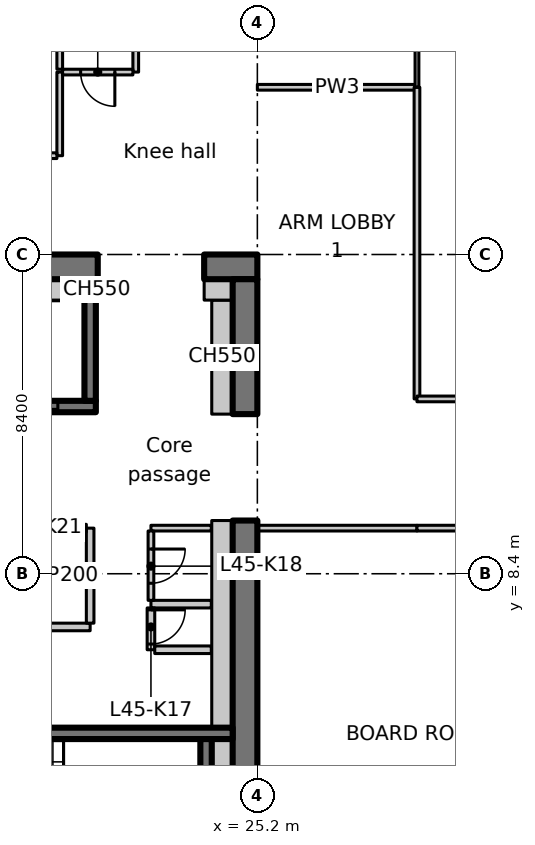
"""IFC4 building model, lengths in metres.
Left out: names, types, materials, properties, quantities, classifications, styles, units other than length and angle.
Written with IfcOpenShell. Run it as: python <this file> out.ifc"""

import sys

from ifc_helpers import new_model, si_unit, direction, frame, frame_2d, origin, place, context, subcontext, project, spatial, polyline, rectangle, outline, extrude, element, fill, save


model = new_model("IFC4")
c1 = context("Model", 3, precision=1e-05, world=origin(), true_north=direction((0.0, 1.0)))
c2 = subcontext(c1, "Body", "Model", "MODEL_VIEW")
j1 = project(units=[si_unit("LENGTHUNIT", "METRE"), si_unit("PLANEANGLEUNIT", "RADIAN")], contexts=[c1])
p1 = place(None, origin())
s1 = spatial("IfcSite", under=j1, at=p1, CompositionType="ELEMENT")
p2 = place(p1, origin())
s2 = spatial("IfcBuilding", under=s1, at=p2, CompositionType="ELEMENT")
p3 = place(p2, frame((0.0, 0.0, 181.2)))
s3 = spatial("IfcBuildingStorey", under=s2, at=p3, CompositionType="ELEMENT", Elevation=181.2)
p4 = place(p3, frame((-1.1, 16.475, 0.0), z_axis=(0.0, 0.0, 1.0), x_axis=(1.0, 0.0, 0.0)))
e1 = element("IfcWall", 1, at=p4, inside=s3, PredefinedType="SHEAR", context=c2, shape_type="SweptSolid", body=[
    extrude(rectangle(XDim=22.1, YDim=0.65, at=frame_2d((11.05, 0.0))), origin(), (0.0, 0.0, 1.0), 3.35),
])
p5 = place(p4, frame((3.15, 0.0, 0.0)))
e2 = element("IfcOpeningElement", 2, at=p5, cuts=e1, PredefinedType="OPENING", context=c2, shape_type="SweptSolid", body=[
    extrude(rectangle(XDim=1.1, YDim=2.3, at=frame_2d((0.55, 1.15))), frame((0.0, 0.335, 0.0), z_axis=(0.0, -1.0, 0.0), x_axis=(1.0, 0.0, 0.0)), (0.0, 0.0, 1.0), 0.67),
])
p6 = place(p3, frame((23.8, 16.475, 0.0), z_axis=(0.0, 0.0, 1.0), x_axis=(1.0, 0.0, 0.0)))
e3 = element("IfcWall", 3, at=p6, inside=s3, PredefinedType="SHEAR", context=c2, shape_type="SweptSolid", body=[
    extrude(rectangle(XDim=1.4, YDim=0.65, at=frame_2d((0.7, 0.0))), origin(), (0.0, 0.0, 1.0), 3.35),
])
p7 = place(p3, frame((24.875, 0.65, 0.0), z_axis=(0.0, 0.0, 1.0), x_axis=(0.0, 1.0, 0.0)))
e4 = element("IfcWall", 4, at=p7, inside=s3, PredefinedType="SHEAR", context=c2, shape_type="SweptSolid", body=[
    extrude(rectangle(XDim=9.15, YDim=0.65, at=frame_2d((4.575, 0.0))), origin(), (0.0, 0.0, 1.0), 3.35),
])
p8 = place(p3, frame((24.875, 12.6, 0.0), z_axis=(0.0, 0.0, 1.0), x_axis=(0.0, 1.0, 0.0)))
e5 = element("IfcWall", 5, at=p8, inside=s3, PredefinedType="SHEAR", context=c2, shape_type="SweptSolid", body=[
    extrude(rectangle(XDim=3.55, YDim=0.65, at=frame_2d((1.775, 0.0))), origin(), (0.0, 0.0, 1.0), 3.35),
])
p9 = place(p3, frame((24.275, 12.6, 0.0), z_axis=(0.0, 0.0, 1.0), x_axis=(0.0, 1.0, 0.0)))
e6 = element("IfcWall", 6, at=p9, inside=s3, PredefinedType="PARTITIONING", context=c2, shape_type="SweptSolid", body=[
    extrude(rectangle(XDim=3.0, YDim=0.55, at=frame_2d((1.5, 0.0))), origin(), (0.0, 0.0, 1.0), 3.35),
])
p10 = place(p3, frame((23.8, 15.875, 0.0), z_axis=(0.0, 0.0, 1.0), x_axis=(1.0, 0.0, 0.0)))
e7 = element("IfcWall", 7, at=p10, inside=s3, PredefinedType="PARTITIONING", context=c2, shape_type="SweptSolid", body=[
    extrude(rectangle(XDim=0.75, YDim=0.55, at=frame_2d((0.375, 0.0))), origin(), (0.0, 0.0, 1.0), 3.35),
])
p11 = place(p3, frame((17.85, 12.8, 0.0), z_axis=(0.0, 0.0, 1.0), x_axis=(1.0, 0.0, 0.0)))
e8 = element("IfcWall", 8, at=p11, inside=s3, PredefinedType="SHEAR", context=c2, shape_type="SweptSolid", body=[
    extrude(rectangle(XDim=3.1, YDim=0.3, at=frame_2d((1.55, 0.0))), origin(), (0.0, 0.0, 1.0), 3.35),
])
p12 = place(p11, frame((1.0, 0.0, 0.0)))
e9 = element("IfcOpeningElement", 9, at=p12, cuts=e8, PredefinedType="OPENING", context=c2, shape_type="SweptSolid", body=[
    extrude(rectangle(XDim=1.1, YDim=2.3, at=frame_2d((0.55, 1.15))), frame((0.0, 0.16, 0.0), z_axis=(0.0, -1.0, 0.0), x_axis=(1.0, 0.0, 0.0)), (0.0, 0.0, 1.0), 0.32),
])
p13 = place(p3, frame((20.8, 12.95, 0.0), z_axis=(0.0, 0.0, 1.0), x_axis=(0.0, 1.0, 0.0)))
e10 = element("IfcWall", 10, at=p13, inside=s3, PredefinedType="SHEAR", context=c2, shape_type="SweptSolid", body=[
    extrude(rectangle(XDim=3.2, YDim=0.3, at=frame_2d((1.6, 0.0))), origin(), (0.0, 0.0, 1.0), 3.35),
])
p14 = place(p3, frame((15.8, 4.2, 0.0), z_axis=(0.0, 0.0, 1.0), x_axis=(1.0, 0.0, 0.0)))
e11 = element("IfcWall", 11, at=p14, inside=s3, PredefinedType="SHEAR", context=c2, shape_type="SweptSolid", body=[
    extrude(rectangle(XDim=8.75, YDim=0.3, at=frame_2d((4.375, 0.0))), origin(), (0.0, 0.0, 1.0), 3.35),
])
p15 = place(p14, frame((0.4, 0.0, 0.0)))
e12 = element("IfcOpeningElement", 12, at=p15, cuts=e11, PredefinedType="OPENING", context=c2, shape_type="SweptSolid", body=[
    extrude(rectangle(XDim=1.0, YDim=2.1, at=frame_2d((0.5, 1.05))), frame((0.0, 0.16, 0.0), z_axis=(0.0, -1.0, 0.0), x_axis=(1.0, 0.0, 0.0)), (0.0, 0.0, 1.0), 0.32),
])
p16 = place(p3, frame((23.85, 1.5, 0.0), z_axis=(0.0, 0.0, 1.0), x_axis=(0.0, 1.0, 0.0)))
e13 = element("IfcWall", 13, at=p16, inside=s3, PredefinedType="SHEAR", context=c2, shape_type="SweptSolid", body=[
    extrude(rectangle(XDim=2.55, YDim=0.3, at=frame_2d((1.275, 0.0))), origin(), (0.0, 0.0, 1.0), 3.35),
])
p17 = place(p3, frame((12.4, 7.0, 0.0), z_axis=(0.0, 0.0, 1.0), x_axis=(1.0, 0.0, 0.0)))
e14 = element("IfcWall", 14, at=p17, inside=s3, PredefinedType="PARTITIONING", context=c2, shape_type="SweptSolid", body=[
    extrude(rectangle(XDim=8.4, YDim=0.2, at=frame_2d((4.2, 0.0))), origin(), (0.0, 0.0, 1.0), 3.35),
])
p18 = place(p3, frame((20.8, 7.1, 0.0), z_axis=(0.0, 0.0, 1.0), x_axis=(0.0, 1.0, 0.0)))
e15 = element("IfcWall", 15, at=p18, inside=s3, PredefinedType="PARTITIONING", context=c2, shape_type="SweptSolid", body=[
    extrude(rectangle(XDim=2.5, YDim=0.2, at=frame_2d((1.25, 0.0))), origin(), (0.0, 0.0, 1.0), 3.35),
])
p19 = place(p3, frame((20.7, 9.6, 0.0), z_axis=(0.0, 0.0, 1.0), x_axis=(-1.0, 0.0, 0.0)))
e16 = element("IfcWall", 16, at=p19, inside=s3, PredefinedType="PARTITIONING", context=c2, shape_type="SweptSolid", body=[
    extrude(rectangle(XDim=8.3, YDim=0.2, at=frame_2d((4.15, 0.0))), origin(), (0.0, 0.0, 1.0), 3.35),
])
p20 = place(p19, frame((3.65, 0.0, 0.0)))
e17 = element("IfcOpeningElement", 17, at=p20, cuts=e16, PredefinedType="OPENING", context=c2, shape_type="SweptSolid", body=[
    extrude(rectangle(XDim=0.9, YDim=2.1, at=frame_2d((0.45, 1.05))), frame((0.0, 0.11, 0.0), z_axis=(0.0, -1.0, 0.0), x_axis=(1.0, 0.0, 0.0)), (0.0, 0.0, 1.0), 0.22),
])
p21 = place(p3, frame((23.988, 7.6, 0.0), z_axis=(0.0, 0.0, 1.0), x_axis=(-1.0, 0.0, 0.0)))
e18 = element("IfcWall", 18, at=p21, inside=s3, PredefinedType="PARTITIONING", context=c2, shape_type="SweptSolid", body=[
    extrude(rectangle(XDim=1.588, YDim=0.2, at=frame_2d((0.794, 0.0))), origin(), (0.0, 0.0, 1.0), 3.35),
])
p22 = place(p3, frame((22.4, 7.5, 0.0), z_axis=(0.0, 0.0, 1.0), x_axis=(0.0, -1.0, 0.0)))
e19 = element("IfcWall", 19, at=p22, inside=s3, PredefinedType="PARTITIONING", context=c2, shape_type="SweptSolid", body=[
    extrude(rectangle(XDim=1.1, YDim=0.2, at=frame_2d((0.55, 0.0))), origin(), (0.0, 0.0, 1.0), 3.35),
])
p23 = place(p22, frame((0.05, 0.0, 0.0)))
e20 = element("IfcOpeningElement", 20, at=p23, cuts=e19, PredefinedType="OPENING", context=c2, shape_type="SweptSolid", body=[
    extrude(rectangle(XDim=0.9, YDim=2.1, at=frame_2d((0.45, 1.05))), frame((0.0, 0.11, 0.0), z_axis=(0.0, -1.0, 0.0), x_axis=(1.0, 0.0, 0.0)), (0.0, 0.0, 1.0), 0.22),
])
p24 = place(p3, frame((22.5, 6.4, 0.0), z_axis=(0.0, 0.0, 1.0), x_axis=(1.0, 0.0, 0.0)))
e21 = element("IfcWall", 21, at=p24, inside=s3, PredefinedType="PARTITIONING", context=c2, shape_type="SweptSolid", body=[
    extrude(rectangle(XDim=1.488, YDim=0.2, at=frame_2d((0.744, 0.0))), origin(), (0.0, 0.0, 1.0), 3.35),
])
p25 = place(p3, frame((20.0, 21.6, 0.0), z_axis=(0.0, 0.0, 1.0), x_axis=(0.0, -1.0, 0.0)))
e22 = element("IfcWall", 22, at=p25, inside=s3, PredefinedType="PARTITIONING", context=c2, shape_type="SweptSolid", body=[
    extrude(rectangle(XDim=2.2, YDim=0.15, at=frame_2d((1.1, 0.0))), origin(), (0.0, 0.0, 1.0), 3.35),
])
p26 = place(p3, frame((19.925, 19.4, 0.0), z_axis=(0.0, 0.0, 1.0), x_axis=(-1.0, 0.0, 0.0)))
e23 = element("IfcWall", 23, at=p26, inside=s3, PredefinedType="PARTITIONING", context=c2, shape_type="SweptSolid", body=[
    extrude(rectangle(XDim=5.725, YDim=0.15, at=frame_2d((2.863, 0.0))), origin(), (0.0, 0.0, 1.0), 3.35),
])
p27 = place(p26, frame((2.325, 0.0, 0.0)))
e24 = element("IfcOpeningElement", 24, at=p27, cuts=e23, PredefinedType="OPENING", context=c2, shape_type="SweptSolid", body=[
    extrude(rectangle(XDim=1.0, YDim=2.1, at=frame_2d((0.5, 1.05))), frame((0.0, 0.085, 0.0), z_axis=(0.0, -1.0, 0.0), x_axis=(1.0, 0.0, 0.0)), (0.0, 0.0, 1.0), 0.17),
])
p28 = place(p3, frame((22.0, 23.925, 0.0), z_axis=(0.0, 0.0, 1.0), x_axis=(0.0, -1.0, 0.0)))
e25 = element("IfcWall", 25, at=p28, inside=s3, PredefinedType="PARTITIONING", context=c2, shape_type="SweptSolid", body=[
    extrude(rectangle(XDim=2.325, YDim=0.15, at=frame_2d((1.163, 0.0))), origin(), (0.0, 0.0, 1.0), 3.35),
])
p29 = place(p3, frame((21.925, 21.6, 0.0), z_axis=(0.0, 0.0, 1.0), x_axis=(-1.0, 0.0, 0.0)))
e26 = element("IfcWall", 26, at=p29, inside=s3, PredefinedType="PARTITIONING", context=c2, shape_type="SweptSolid", body=[
    extrude(rectangle(XDim=1.85, YDim=0.15, at=frame_2d((0.925, 0.0))), origin(), (0.0, 0.0, 1.0), 3.35),
])
p30 = place(p29, frame((0.475, 0.0, 0.0)))
e27 = element("IfcOpeningElement", 27, at=p30, cuts=e26, PredefinedType="OPENING", context=c2, shape_type="SweptSolid", body=[
    extrude(rectangle(XDim=0.9, YDim=2.1, at=frame_2d((0.45, 1.05))), frame((0.0, 0.085, 0.0), z_axis=(0.0, -1.0, 0.0), x_axis=(1.0, 0.0, 0.0)), (0.0, 0.0, 1.0), 0.17),
])
p31 = place(p3, frame((20.0, 21.675, 0.0), z_axis=(0.0, 0.0, 1.0), x_axis=(0.0, 1.0, 0.0)))
e28 = element("IfcWall", 28, at=p31, inside=s3, PredefinedType="PARTITIONING", context=c2, shape_type="SweptSolid", body=[
    extrude(rectangle(XDim=2.15, YDim=0.15, at=frame_2d((1.075, 0.0))), origin(), (0.0, 0.0, 1.0), 3.35),
])
p32 = place(p3, frame((23.988, 9.6, 0.0), z_axis=(0.0, 0.0, 1.0), x_axis=(-1.0, 0.0, 0.0)))
e29 = element("IfcWall", 29, at=p32, inside=s3, PredefinedType="PARTITIONING", context=c2, shape_type="SweptSolid", body=[
    extrude(rectangle(XDim=1.588, YDim=0.15, at=frame_2d((0.794, 0.0))), origin(), (0.0, 0.0, 1.0), 3.35),
])
p33 = place(p3, frame((22.4, 9.525, 0.0), z_axis=(0.0, 0.0, 1.0), x_axis=(0.0, -1.0, 0.0)))
e30 = element("IfcWall", 30, at=p33, inside=s3, PredefinedType="PARTITIONING", context=c2, shape_type="SweptSolid", body=[
    extrude(rectangle(XDim=1.825, YDim=0.15, at=frame_2d((0.913, 0.0))), origin(), (0.0, 0.0, 1.0), 3.35),
])
p34 = place(p33, frame((0.475, 0.0, 0.0)))
e31 = element("IfcOpeningElement", 31, at=p34, cuts=e30, PredefinedType="OPENING", context=c2, shape_type="SweptSolid", body=[
    extrude(rectangle(XDim=0.9, YDim=2.1, at=frame_2d((0.45, 1.05))), frame((0.0, 0.085, 0.0), z_axis=(0.0, -1.0, 0.0), x_axis=(1.0, 0.0, 0.0)), (0.0, 0.0, 1.0), 0.17),
])
p35 = place(p3, frame((18.15, 15.875, 0.0), z_axis=(0.0, 0.0, 1.0), x_axis=(1.0, 0.0, 0.0)))
e32 = element("IfcWall", 32, at=p35, inside=s3, PredefinedType="PARTITIONING", context=c2, shape_type="SweptSolid", body=[
    extrude(rectangle(XDim=2.5, YDim=0.55, at=frame_2d((1.25, 0.0))), origin(), (0.0, 0.0, 1.0), 3.35),
])
p36 = place(p3, frame((20.95, 15.875, 0.0), z_axis=(0.0, 0.0, 1.0), x_axis=(1.0, 0.0, 0.0)))
e33 = element("IfcWall", 33, at=p36, inside=s3, PredefinedType="PARTITIONING", context=c2, shape_type="SweptSolid", body=[
    extrude(rectangle(XDim=0.05, YDim=0.55, at=frame_2d((0.025, 0.0))), origin(), (0.0, 0.0, 1.0), 3.35),
])
p37 = place(p3, frame((24.275, 1.5, 0.0), z_axis=(0.0, 0.0, 1.0), x_axis=(0.0, 1.0, 0.0)))
e34 = element("IfcWall", 34, at=p37, inside=s3, PredefinedType="PARTITIONING", context=c2, shape_type="SweptSolid", body=[
    extrude(rectangle(XDim=2.55, YDim=0.55, at=frame_2d((1.275, 0.0))), origin(), (0.0, 0.0, 1.0), 3.35),
])
p38 = place(p3, frame((24.275, 4.35, 0.0), z_axis=(0.0, 0.0, 1.0), x_axis=(0.0, 1.0, 0.0)))
e35 = element("IfcWall", 35, at=p38, inside=s3, PredefinedType="PARTITIONING", context=c2, shape_type="SweptSolid", body=[
    extrude(rectangle(XDim=5.45, YDim=0.55, at=frame_2d((2.725, 0.0))), origin(), (0.0, 0.0, 1.0), 3.35),
])
for number, where, z_axis, x_axis in (
    (36, (25.2, 21.2, 0.0), (0.0, 0.0, 1.0), (1.0, 0.0, 0.0)),
    (37, (29.4, 9.6, 0.0), (0.0, 0.0, 1.0), (-1.0, 0.0, 0.0)),
):
    element("IfcWall", number, at=place(p3, frame(where, z_axis=z_axis, x_axis=x_axis)), inside=s3, PredefinedType="PARTITIONING", context=c2, shape_type="SweptSolid", body=[
        extrude(rectangle(XDim=4.2, YDim=0.15, at=frame_2d((2.1, 0.0))), origin(), (0.0, 0.0, 1.0), 3.33),
    ])
p39 = place(p3, frame((29.4, 21.2, 0.0), z_axis=(0.0, 0.0, 1.0), x_axis=(0.0, -1.0, 0.0)))
e38 = element("IfcWall", 38, at=p39, inside=s3, PredefinedType="PARTITIONING", context=c2, shape_type="SweptSolid", body=[
    extrude(rectangle(XDim=8.2, YDim=0.15, at=frame_2d((4.1, 0.0))), origin(), (0.0, 0.0, 1.0), 3.33),
])
p40 = place(p3, frame((29.4, 27.511, 0.0), z_axis=(0.0, 0.0, 1.0), x_axis=(0.0, -1.0, 0.0)))
e39 = element("IfcWall", 39, at=p40, inside=s3, PredefinedType="PARTITIONING", context=c2, shape_type="SweptSolid", body=[
    extrude(outline(polyline([(0.0, 0.0), (6.311, 0.0), (6.311, 3.33), (2.761, 3.33), (2.759, 2.98), (1.863, 2.98), (1.861, 3.33), (0.236, 3.33), (0.0, 3.33), (0.0, 0.0)])), frame((0.0, 0.05, 0.0), z_axis=(0.0, -1.0, 0.0), x_axis=(1.0, 0.0, 0.0)), (0.0, 0.0, 1.0), 0.1),
])
for number, where, z_axis, x_axis in (
    (40, (33.6, 9.6, 0.0), (0.0, 0.0, 1.0), (-1.0, 0.0, 0.0)),
    (41, (29.4, 13.0, 0.0), (0.0, 0.0, 1.0), (1.0, 0.0, 0.0)),
):
    element("IfcWall", number, at=place(p3, frame(where, z_axis=z_axis, x_axis=x_axis)), inside=s3, PredefinedType="PARTITIONING", context=c2, shape_type="SweptSolid", body=[
        extrude(rectangle(XDim=4.2, YDim=0.15, at=frame_2d((2.1, 0.0))), origin(), (0.0, 0.0, 1.0), 3.33),
    ])
p41 = place(p12, origin())
e42 = element("IfcDoor", 42, at=p41, inside=s3, OperationType="SLIDING_TO_LEFT", PredefinedType="DOOR", context=c2, shape_type="SweptSolid", body=[
    extrude(rectangle(XDim=1.1, YDim=2.3, at=frame_2d((0.55, 1.15))), frame((0.0, 0.025, 0.0), z_axis=(0.0, -1.0, 0.0), x_axis=(1.0, 0.0, 0.0)), (0.0, 0.0, 1.0), 0.05),
])
fill(e9, e42)
p42 = place(p23, origin())
e43 = element("IfcDoor", 43, at=p42, inside=s3, OperationType="SINGLE_SWING_RIGHT", PredefinedType="DOOR", context=c2, shape_type="SweptSolid", body=[
    extrude(rectangle(XDim=0.9, YDim=2.1, at=frame_2d((0.45, 1.05))), frame((0.0, 0.025, 0.0), z_axis=(0.0, -1.0, 0.0), x_axis=(1.0, 0.0, 0.0)), (0.0, 0.0, 1.0), 0.05),
])
fill(e20, e43)
p43 = place(p34, origin())
e44 = element("IfcDoor", 44, at=p43, inside=s3, OperationType="SINGLE_SWING_LEFT", PredefinedType="DOOR", context=c2, shape_type="SweptSolid", body=[
    extrude(rectangle(XDim=0.9, YDim=2.1, at=frame_2d((0.45, 1.05))), frame((0.0, 0.025, 0.0), z_axis=(0.0, -1.0, 0.0), x_axis=(1.0, 0.0, 0.0)), (0.0, 0.0, 1.0), 0.05),
])
fill(e31, e44)
p44 = place(p30, origin())
e45 = element("IfcDoor", 45, at=p44, inside=s3, OperationType="SINGLE_SWING_RIGHT", PredefinedType="DOOR", context=c2, shape_type="SweptSolid", body=[
    extrude(rectangle(XDim=0.9, YDim=2.1, at=frame_2d((0.45, 1.05))), frame((0.0, 0.025, 0.0), z_axis=(0.0, -1.0, 0.0), x_axis=(1.0, 0.0, 0.0)), (0.0, 0.0, 1.0), 0.05),
])
fill(e27, e45)
save(model, sys.argv[1])
